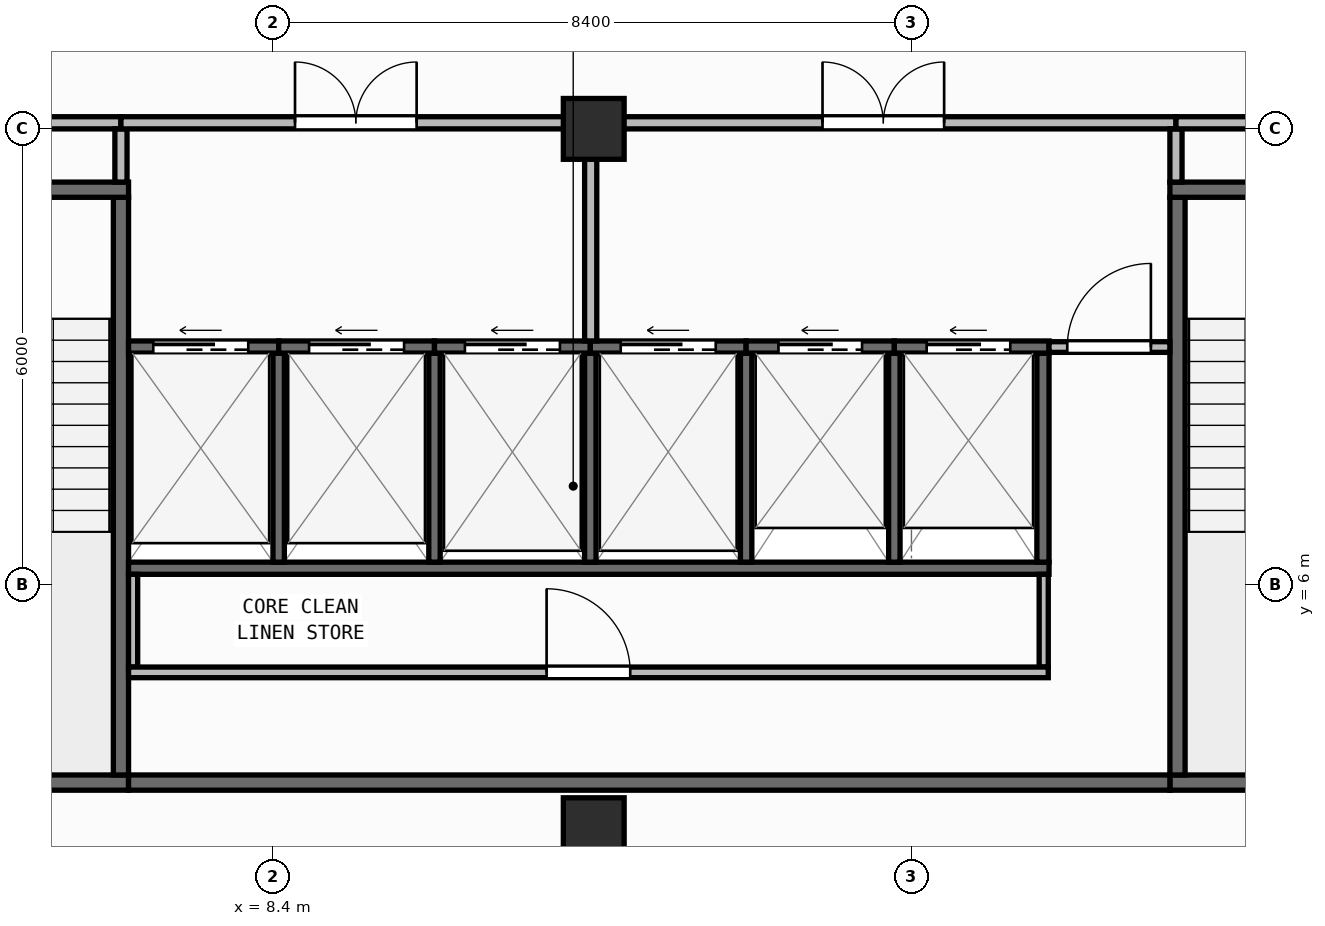
"""IFC4 building model, lengths in metres.
Left out: names, types, materials, properties, quantities, classifications, styles, units other than length and angle.
Written with IfcOpenShell. Run it as: python <this file> out.ifc"""

import sys

from ifc_helpers import new_model, si_unit, direction, frame, frame_2d, origin, origin_2d, place, context, subcontext, project, spatial, rectangle, extrude, element, fill, save


model = new_model("IFC4")
c1 = context("Model", 3, precision=1e-05, world=origin(), true_north=direction((0.0, 1.0)))
c2 = subcontext(c1, "Body", "Model", "MODEL_VIEW")
j1 = project(units=[si_unit("LENGTHUNIT", "METRE"), si_unit("PLANEANGLEUNIT", "RADIAN")], contexts=[c1])
p1 = place(None, origin())
s1 = spatial("IfcSite", under=j1, at=p1, CompositionType="ELEMENT")
p2 = place(p1, origin())
s2 = spatial("IfcBuilding", under=s1, at=p2, CompositionType="ELEMENT")
p3 = place(p2, frame((0.0, 0.0, 252.6)))
s3 = spatial("IfcBuildingStorey", under=s2, at=p3, CompositionType="ELEMENT", Elevation=252.6)
for number, where, z_axis, x_axis in (
    (1, (12.62, 2.8, 0.0), (0.0, 0.0, 1.0), (1.0, 0.0, 0.0)),
    (2, (12.62, 12.0, 0.0), (0.0, 0.0, 1.0), (1.0, 0.0, 0.0)),
):
    element("IfcColumn", number, at=place(p3, frame(where, z_axis=z_axis, x_axis=x_axis)), inside=s3, PredefinedType="COLUMN", context=c2, shape_type="SweptSolid", body=[
        extrude(rectangle(XDim=0.8, YDim=0.8, at=origin_2d()), origin(), (0.0, 0.0, 1.0), 3.95),
    ])
p4 = place(p3, frame((2.66, 0.174, 0.0), z_axis=(0.0, 0.0, 1.0), x_axis=(0.996611813627, 0.082248969229, 0.0)))
e3 = element("IfcWall", 3, at=p4, inside=s3, PredefinedType="STANDARD", context=c2, shape_type="SweptSolid", body=[
    extrude(rectangle(XDim=41.019, YDim=0.26, at=frame_2d((20.51, 0.0))), origin(), (0.0, 0.0, 1.0), 3.71),
])
p5 = place(p4, frame((19.31, 0.0, 0.9)))
e4 = element("IfcOpeningElement", 4, at=p5, cuts=e3, PredefinedType="OPENING", context=c2, shape_type="SweptSolid", body=[
    extrude(rectangle(XDim=2.4, YDim=1.65, at=frame_2d((1.2, 0.825))), frame((0.0, 0.14, 0.0), z_axis=(0.0, -1.0, 0.0), x_axis=(1.0, 0.0, 0.0)), (0.0, 0.0, 1.0), 0.28),
])
p6 = place(p3, frame((2.8, 3.4, 0.0), z_axis=(0.0, 0.0, 1.0), x_axis=(1.0, 0.0, 0.0)))
e5 = element("IfcWall", 5, at=p6, inside=s3, PredefinedType="SHEAR", context=c2, shape_type="SweptSolid", body=[
    extrude(rectangle(XDim=3.7, YDim=0.2, at=frame_2d((1.85, 0.0))), origin(), (0.0, 0.0, 1.0), 3.71),
])
p7 = place(p3, frame((6.4, 3.5, 0.0), z_axis=(0.0, 0.0, 1.0), x_axis=(0.0, 1.0, 0.0)))
e6 = element("IfcWall", 6, at=p7, inside=s3, PredefinedType="SHEAR", context=c2, shape_type="SweptSolid", body=[
    extrude(rectangle(XDim=7.6, YDim=0.2, at=frame_2d((3.8, 0.0))), origin(), (0.0, 0.0, 1.0), 3.71),
])
p8 = place(p3, frame((2.8, 11.2, 0.0), z_axis=(0.0, 0.0, 1.0), x_axis=(1.0, 0.0, 0.0)))
e7 = element("IfcWall", 7, at=p8, inside=s3, PredefinedType="SHEAR", context=c2, shape_type="SweptSolid", body=[
    extrude(rectangle(XDim=3.7, YDim=0.2, at=frame_2d((1.85, 0.0))), origin(), (0.0, 0.0, 1.0), 3.71),
])
p9 = place(p8, frame((1.2, 0.0, 0.0)))
e8 = element("IfcOpeningElement", 8, at=p9, cuts=e7, PredefinedType="OPENING", context=c2, shape_type="SweptSolid", body=[
    extrude(rectangle(XDim=1.3, YDim=2.15, at=frame_2d((0.65, 1.075))), frame((0.0, 0.11, 0.0), z_axis=(0.0, -1.0, 0.0), x_axis=(1.0, 0.0, 0.0)), (0.0, 0.0, 1.0), 0.22),
])
p10 = place(p3, frame((20.2, 3.4, 0.0), z_axis=(0.0, 0.0, 1.0), x_axis=(1.0, 0.0, 0.0)))
e9 = element("IfcWall", 9, at=p10, inside=s3, PredefinedType="SHEAR", context=c2, shape_type="SweptSolid", body=[
    extrude(rectangle(XDim=3.7, YDim=0.2, at=frame_2d((1.85, 0.0))), origin(), (0.0, 0.0, 1.0), 3.71),
])
p11 = place(p3, frame((20.3, 3.5, 0.0), z_axis=(0.0, 0.0, 1.0), x_axis=(0.0, 1.0, 0.0)))
e10 = element("IfcWall", 10, at=p11, inside=s3, PredefinedType="SHEAR", context=c2, shape_type="SweptSolid", body=[
    extrude(rectangle(XDim=7.6, YDim=0.2, at=frame_2d((3.8, 0.0))), origin(), (0.0, 0.0, 1.0), 3.71),
])
p12 = place(p3, frame((20.2, 11.2, 0.0), z_axis=(0.0, 0.0, 1.0), x_axis=(1.0, 0.0, 0.0)))
e11 = element("IfcWall", 11, at=p12, inside=s3, PredefinedType="SHEAR", context=c2, shape_type="SweptSolid", body=[
    extrude(rectangle(XDim=3.7, YDim=0.2, at=frame_2d((1.85, 0.0))), origin(), (0.0, 0.0, 1.0), 3.71),
])
p13 = place(p12, frame((1.2, 0.0, 0.0)))
e12 = element("IfcOpeningElement", 12, at=p13, cuts=e11, PredefinedType="OPENING", context=c2, shape_type="SweptSolid", body=[
    extrude(rectangle(XDim=1.3, YDim=2.15, at=frame_2d((0.65, 1.075))), frame((0.0, 0.11, 0.0), z_axis=(0.0, -1.0, 0.0), x_axis=(1.0, 0.0, 0.0)), (0.0, 0.0, 1.0), 0.22),
])
p14 = place(p3, frame((6.5, 3.4, 0.0), z_axis=(0.0, 0.0, 1.0), x_axis=(1.0, 0.0, 0.0)))
e13 = element("IfcWall", 13, at=p14, inside=s3, PredefinedType="SHEAR", context=c2, shape_type="SweptSolid", body=[
    extrude(rectangle(XDim=13.7, YDim=0.2, at=frame_2d((6.85, 0.0))), origin(), (0.0, 0.0, 1.0), 3.71),
])
p15 = place(p3, frame((6.5, 6.22, 0.0), z_axis=(0.0, 0.0, 1.0), x_axis=(1.0, 0.0, 0.0)))
e14 = element("IfcWall", 14, at=p15, inside=s3, PredefinedType="SHEAR", context=c2, shape_type="SweptSolid", body=[
    extrude(rectangle(XDim=12.11, YDim=0.16, at=frame_2d((6.055, 0.0))), origin(), (0.0, 0.0, 1.0), 3.71),
])
p16 = place(p3, frame((18.53, 6.3, 0.0), z_axis=(0.0, 0.0, 1.0), x_axis=(0.0, 1.0, 0.0)))
e15 = element("IfcWall", 15, at=p16, inside=s3, PredefinedType="SHEAR", context=c2, shape_type="SweptSolid", body=[
    extrude(rectangle(XDim=2.75, YDim=0.16, at=frame_2d((1.375, 0.0))), origin(), (0.0, 0.0, 1.0), 3.71),
])
for number, where, z_axis, x_axis in (
    (16, (8.475, 6.3, 0.0), (0.0, 0.0, 1.0), (0.0, 1.0, 0.0)),
    (17, (10.525, 6.3, 0.0), (0.0, 0.0, 1.0), (0.0, 1.0, 0.0)),
    (18, (12.575, 6.3, 0.0), (0.0, 0.0, 1.0), (0.0, 1.0, 0.0)),
    (19, (14.625, 6.3, 0.0), (0.0, 0.0, 1.0), (0.0, 1.0, 0.0)),
    (20, (16.575, 6.3, 0.0), (0.0, 0.0, 1.0), (0.0, 1.0, 0.0)),
):
    element("IfcWall", number, at=place(p3, frame(where, z_axis=z_axis, x_axis=x_axis)), inside=s3, PredefinedType="SHEAR", context=c2, shape_type="SweptSolid", body=[
        extrude(rectangle(XDim=2.75, YDim=0.15, at=frame_2d((1.375, 0.0))), origin(), (0.0, 0.0, 1.0), 3.71),
    ])
p17 = place(p3, frame((6.5, 9.13, 0.0), z_axis=(0.0, 0.0, 1.0), x_axis=(1.0, 0.0, 0.0)))
e21 = element("IfcWall", 21, at=p17, inside=s3, PredefinedType="SHEAR", context=c2, shape_type="SweptSolid", body=[
    extrude(rectangle(XDim=1.975, YDim=0.16, at=frame_2d((0.988, 0.0))), origin(), (0.0, 0.0, 1.0), 3.71),
])
p18 = place(p17, frame((0.325, 0.0, 0.0)))
e22 = element("IfcOpeningElement", 22, at=p18, cuts=e21, PredefinedType="OPENING", context=c2, shape_type="SweptSolid", body=[
    extrude(rectangle(XDim=1.25, YDim=2.15, at=frame_2d((0.625, 1.075))), frame((0.0, 0.09, 0.0), z_axis=(0.0, -1.0, 0.0), x_axis=(1.0, 0.0, 0.0)), (0.0, 0.0, 1.0), 0.18),
])
p19 = place(p3, frame((8.475, 9.13, 0.0), z_axis=(0.0, 0.0, 1.0), x_axis=(1.0, 0.0, 0.0)))
e23 = element("IfcWall", 23, at=p19, inside=s3, PredefinedType="SHEAR", context=c2, shape_type="SweptSolid", body=[
    extrude(rectangle(XDim=2.05, YDim=0.16, at=frame_2d((1.025, 0.0))), origin(), (0.0, 0.0, 1.0), 3.71),
])
p20 = place(p19, frame((0.4, 0.0, 0.0)))
e24 = element("IfcOpeningElement", 24, at=p20, cuts=e23, PredefinedType="OPENING", context=c2, shape_type="SweptSolid", body=[
    extrude(rectangle(XDim=1.25, YDim=2.15, at=frame_2d((0.625, 1.075))), frame((0.0, 0.09, 0.0), z_axis=(0.0, -1.0, 0.0), x_axis=(1.0, 0.0, 0.0)), (0.0, 0.0, 1.0), 0.18),
])
p21 = place(p3, frame((10.525, 9.13, 0.0), z_axis=(0.0, 0.0, 1.0), x_axis=(1.0, 0.0, 0.0)))
e25 = element("IfcWall", 25, at=p21, inside=s3, PredefinedType="SHEAR", context=c2, shape_type="SweptSolid", body=[
    extrude(rectangle(XDim=2.05, YDim=0.16, at=frame_2d((1.025, 0.0))), origin(), (0.0, 0.0, 1.0), 3.71),
])
p22 = place(p21, frame((0.4, 0.0, 0.0)))
e26 = element("IfcOpeningElement", 26, at=p22, cuts=e25, PredefinedType="OPENING", context=c2, shape_type="SweptSolid", body=[
    extrude(rectangle(XDim=1.25, YDim=2.15, at=frame_2d((0.625, 1.075))), frame((0.0, 0.09, 0.0), z_axis=(0.0, -1.0, 0.0), x_axis=(1.0, 0.0, 0.0)), (0.0, 0.0, 1.0), 0.18),
])
p23 = place(p3, frame((12.575, 9.13, 0.0), z_axis=(0.0, 0.0, 1.0), x_axis=(1.0, 0.0, 0.0)))
e27 = element("IfcWall", 27, at=p23, inside=s3, PredefinedType="SHEAR", context=c2, shape_type="SweptSolid", body=[
    extrude(rectangle(XDim=2.05, YDim=0.16, at=frame_2d((1.025, 0.0))), origin(), (0.0, 0.0, 1.0), 3.71),
])
p24 = place(p23, frame((0.4, 0.0, 0.0)))
e28 = element("IfcOpeningElement", 28, at=p24, cuts=e27, PredefinedType="OPENING", context=c2, shape_type="SweptSolid", body=[
    extrude(rectangle(XDim=1.25, YDim=2.15, at=frame_2d((0.625, 1.075))), frame((0.0, 0.09, 0.0), z_axis=(0.0, -1.0, 0.0), x_axis=(1.0, 0.0, 0.0)), (0.0, 0.0, 1.0), 0.18),
])
p25 = place(p3, frame((14.625, 9.13, 0.0), z_axis=(0.0, 0.0, 1.0), x_axis=(1.0, 0.0, 0.0)))
e29 = element("IfcWall", 29, at=p25, inside=s3, PredefinedType="SHEAR", context=c2, shape_type="SweptSolid", body=[
    extrude(rectangle(XDim=1.95, YDim=0.16, at=frame_2d((0.975, 0.0))), origin(), (0.0, 0.0, 1.0), 3.71),
])
p26 = place(p25, frame((0.425, 0.0, 0.0)))
e30 = element("IfcOpeningElement", 30, at=p26, cuts=e29, PredefinedType="OPENING", context=c2, shape_type="SweptSolid", body=[
    extrude(rectangle(XDim=1.1, YDim=2.15, at=frame_2d((0.55, 1.075))), frame((0.0, 0.09, 0.0), z_axis=(0.0, -1.0, 0.0), x_axis=(1.0, 0.0, 0.0)), (0.0, 0.0, 1.0), 0.18),
])
p27 = place(p3, frame((16.575, 9.13, 0.0), z_axis=(0.0, 0.0, 1.0), x_axis=(1.0, 0.0, 0.0)))
e31 = element("IfcWall", 31, at=p27, inside=s3, PredefinedType="SHEAR", context=c2, shape_type="SweptSolid", body=[
    extrude(rectangle(XDim=2.035, YDim=0.16, at=frame_2d((1.018, 0.0))), origin(), (0.0, 0.0, 1.0), 3.71),
])
p28 = place(p27, frame((0.425, 0.0, 0.0)))
e32 = element("IfcOpeningElement", 32, at=p28, cuts=e31, PredefinedType="OPENING", context=c2, shape_type="SweptSolid", body=[
    extrude(rectangle(XDim=1.1, YDim=2.15, at=frame_2d((0.55, 1.075))), frame((0.0, 0.09, 0.0), z_axis=(0.0, -1.0, 0.0), x_axis=(1.0, 0.0, 0.0)), (0.0, 0.0, 1.0), 0.18),
])
for number, where, z_axis, x_axis in (
    (33, (6.56, 4.92, 0.0), (0.0, 0.0, 1.0), (0.0, 1.0, 0.0)),
    (34, (18.54, 4.92, 0.0), (0.0, 0.0, 1.0), (0.0, 1.0, 0.0)),
):
    element("IfcWall", number, at=place(p3, frame(where, z_axis=z_axis, x_axis=x_axis)), inside=s3, PredefinedType="PARTITIONING", context=c2, shape_type="SweptSolid", body=[
        extrude(rectangle(XDim=1.22, YDim=0.12, at=frame_2d((0.61, 0.0))), origin(), (0.0, 0.0, 1.0), 3.71),
    ])
p29 = place(p3, frame((6.5, 4.85, 0.0), z_axis=(0.0, 0.0, 1.0), x_axis=(1.0, 0.0, 0.0)))
e35 = element("IfcWall", 35, at=p29, inside=s3, PredefinedType="PARTITIONING", context=c2, shape_type="SweptSolid", body=[
    extrude(rectangle(XDim=12.1, YDim=0.14, at=frame_2d((6.05, 0.0))), origin(), (0.0, 0.0, 1.0), 3.71),
])
p30 = place(p29, frame((5.5, 0.0, 0.0)))
e36 = element("IfcOpeningElement", 36, at=p30, cuts=e35, PredefinedType="OPENING", context=c2, shape_type="SweptSolid", body=[
    extrude(rectangle(XDim=1.1, YDim=2.1, at=frame_2d((0.55, 1.05))), frame((0.0, 0.08, 0.0), z_axis=(0.0, -1.0, 0.0), x_axis=(1.0, 0.0, 0.0)), (0.0, 0.0, 1.0), 0.16),
])
p31 = place(p3, frame((18.61, 9.13, 0.0), z_axis=(0.0, 0.0, 1.0), x_axis=(1.0, 0.0, 0.0)))
e37 = element("IfcWall", 37, at=p31, inside=s3, PredefinedType="PARTITIONING", context=c2, shape_type="SweptSolid", body=[
    extrude(rectangle(XDim=1.59, YDim=0.14, at=frame_2d((0.795, 0.0))), origin(), (0.0, 0.0, 1.0), 3.71),
])
p32 = place(p31, frame((0.24, 0.0, 0.0)))
e38 = element("IfcOpeningElement", 38, at=p32, cuts=e37, PredefinedType="OPENING", context=c2, shape_type="SweptSolid", body=[
    extrude(rectangle(XDim=1.1, YDim=2.1, at=frame_2d((0.55, 1.05))), frame((0.0, 0.08, 0.0), z_axis=(0.0, -1.0, 0.0), x_axis=(1.0, 0.0, 0.0)), (0.0, 0.0, 1.0), 0.16),
])
p33 = place(p3, frame((2.8, 12.08, 0.0), z_axis=(0.0, 0.0, 1.0), x_axis=(1.0, 0.0, 0.0)))
e39 = element("IfcWall", 39, at=p33, inside=s3, PredefinedType="PARTITIONING", context=c2, shape_type="SweptSolid", body=[
    extrude(rectangle(XDim=3.6, YDim=0.16, at=frame_2d((1.8, 0.0))), origin(), (0.0, 0.0, 1.0), 3.157),
])
p34 = place(p33, frame((1.0, 0.0, 0.0)))
e40 = element("IfcOpeningElement", 40, at=p34, cuts=e39, PredefinedType="OPENING", context=c2, shape_type="SweptSolid", body=[
    extrude(rectangle(XDim=1.6, YDim=2.05, at=frame_2d((0.8, 1.025))), frame((0.0, 0.09, 0.0), z_axis=(0.0, -1.0, 0.0), x_axis=(1.0, 0.0, 0.0)), (0.0, 0.0, 1.0), 0.18),
])
p35 = place(p3, frame((6.4, 11.3, 0.0), z_axis=(0.0, 0.0, 1.0), x_axis=(0.0, 1.0, 0.0)))
e41 = element("IfcWall", 41, at=p35, inside=s3, PredefinedType="PARTITIONING", context=c2, shape_type="SweptSolid", body=[
    extrude(rectangle(XDim=0.7, YDim=0.16, at=frame_2d((0.35, 0.0))), origin(), (0.0, 0.0, 1.0), 3.71),
])
p36 = place(p3, frame((6.4, 12.08, 0.0), z_axis=(0.0, 0.0, 1.0), x_axis=(1.0, 0.0, 0.0)))
e42 = element("IfcWall", 42, at=p36, inside=s3, PredefinedType="PARTITIONING", context=c2, shape_type="SweptSolid", body=[
    extrude(rectangle(XDim=6.18, YDim=0.16, at=frame_2d((3.09, 0.0))), origin(), (0.0, 0.0, 1.0), 3.157),
])
p37 = place(p36, frame((2.29, 0.0, 0.0)))
e43 = element("IfcOpeningElement", 43, at=p37, cuts=e42, PredefinedType="OPENING", context=c2, shape_type="SweptSolid", body=[
    extrude(rectangle(XDim=1.6, YDim=2.05, at=frame_2d((0.8, 1.025))), frame((0.0, 0.09, 0.0), z_axis=(0.0, -1.0, 0.0), x_axis=(1.0, 0.0, 0.0)), (0.0, 0.0, 1.0), 0.18),
])
p38 = place(p3, frame((12.58, 9.21, 0.0), z_axis=(0.0, 0.0, 1.0), x_axis=(0.0, 1.0, 0.0)))
e44 = element("IfcWall", 44, at=p38, inside=s3, PredefinedType="PARTITIONING", context=c2, shape_type="SweptSolid", body=[
    extrude(rectangle(XDim=2.79, YDim=0.16, at=frame_2d((1.395, 0.0))), origin(), (0.0, 0.0, 1.0), 3.71),
])
p39 = place(p3, frame((12.58, 12.08, 0.0), z_axis=(0.0, 0.0, 1.0), x_axis=(1.0, 0.0, 0.0)))
e45 = element("IfcWall", 45, at=p39, inside=s3, PredefinedType="PARTITIONING", context=c2, shape_type="SweptSolid", body=[
    extrude(rectangle(XDim=7.7, YDim=0.16, at=frame_2d((3.85, 0.0))), origin(), (0.0, 0.0, 1.0), 3.157),
])
p40 = place(p39, frame((3.05, 0.0, 0.0)))
e46 = element("IfcOpeningElement", 46, at=p40, cuts=e45, PredefinedType="OPENING", context=c2, shape_type="SweptSolid", body=[
    extrude(rectangle(XDim=1.6, YDim=2.05, at=frame_2d((0.8, 1.025))), frame((0.0, 0.09, 0.0), z_axis=(0.0, -1.0, 0.0), x_axis=(1.0, 0.0, 0.0)), (0.0, 0.0, 1.0), 0.18),
])
p41 = place(p3, frame((20.28, 11.3, 0.0), z_axis=(0.0, 0.0, 1.0), x_axis=(0.0, 1.0, 0.0)))
e47 = element("IfcWall", 47, at=p41, inside=s3, PredefinedType="PARTITIONING", context=c2, shape_type="SweptSolid", body=[
    extrude(rectangle(XDim=0.7, YDim=0.16, at=frame_2d((0.35, 0.0))), origin(), (0.0, 0.0, 1.0), 3.71),
])
p42 = place(p3, frame((20.28, 12.08, 0.0), z_axis=(0.0, 0.0, 1.0), x_axis=(1.0, 0.0, 0.0)))
e48 = element("IfcWall", 48, at=p42, inside=s3, PredefinedType="PARTITIONING", context=c2, shape_type="SweptSolid", body=[
    extrude(rectangle(XDim=3.62, YDim=0.16, at=frame_2d((1.81, 0.0))), origin(), (0.0, 0.0, 1.0), 3.157),
])
p43 = place(p42, frame((1.01, 0.0, 0.0)))
e49 = element("IfcOpeningElement", 49, at=p43, cuts=e48, PredefinedType="OPENING", context=c2, shape_type="SweptSolid", body=[
    extrude(rectangle(XDim=1.6, YDim=2.05, at=frame_2d((0.8, 1.025))), frame((0.0, 0.09, 0.0), z_axis=(0.0, -1.0, 0.0), x_axis=(1.0, 0.0, 0.0)), (0.0, 0.0, 1.0), 0.18),
])
p44 = place(p18, origin())
e50 = element("IfcDoor", 50, at=p44, inside=s3, OperationType="SLIDING_TO_LEFT", PredefinedType="DOOR", context=c2, shape_type="SweptSolid", body=[
    extrude(rectangle(XDim=1.25, YDim=2.15, at=frame_2d((0.625, 1.075))), frame((0.0, 0.025, 0.0), z_axis=(0.0, -1.0, 0.0), x_axis=(1.0, 0.0, 0.0)), (0.0, 0.0, 1.0), 0.05),
])
fill(e22, e50)
p45 = place(p20, origin())
e51 = element("IfcDoor", 51, at=p45, inside=s3, OperationType="SLIDING_TO_LEFT", PredefinedType="DOOR", context=c2, shape_type="SweptSolid", body=[
    extrude(rectangle(XDim=1.25, YDim=2.15, at=frame_2d((0.625, 1.075))), frame((0.0, 0.025, 0.0), z_axis=(0.0, -1.0, 0.0), x_axis=(1.0, 0.0, 0.0)), (0.0, 0.0, 1.0), 0.05),
])
fill(e24, e51)
p46 = place(p22, origin())
e52 = element("IfcDoor", 52, at=p46, inside=s3, OperationType="SLIDING_TO_LEFT", PredefinedType="DOOR", context=c2, shape_type="SweptSolid", body=[
    extrude(rectangle(XDim=1.25, YDim=2.15, at=frame_2d((0.625, 1.075))), frame((0.0, 0.025, 0.0), z_axis=(0.0, -1.0, 0.0), x_axis=(1.0, 0.0, 0.0)), (0.0, 0.0, 1.0), 0.05),
])
fill(e26, e52)
p47 = place(p24, origin())
e53 = element("IfcDoor", 53, at=p47, inside=s3, OperationType="SLIDING_TO_LEFT", PredefinedType="DOOR", context=c2, shape_type="SweptSolid", body=[
    extrude(rectangle(XDim=1.25, YDim=2.15, at=frame_2d((0.625, 1.075))), frame((0.0, 0.025, 0.0), z_axis=(0.0, -1.0, 0.0), x_axis=(1.0, 0.0, 0.0)), (0.0, 0.0, 1.0), 0.05),
])
fill(e28, e53)
p48 = place(p26, origin())
e54 = element("IfcDoor", 54, at=p48, inside=s3, OperationType="SLIDING_TO_LEFT", PredefinedType="DOOR", context=c2, shape_type="SweptSolid", body=[
    extrude(rectangle(XDim=1.1, YDim=2.15, at=frame_2d((0.55, 1.075))), frame((0.0, 0.025, 0.0), z_axis=(0.0, -1.0, 0.0), x_axis=(1.0, 0.0, 0.0)), (0.0, 0.0, 1.0), 0.05),
])
fill(e30, e54)
p49 = place(p28, origin())
e55 = element("IfcDoor", 55, at=p49, inside=s3, OperationType="SLIDING_TO_LEFT", PredefinedType="DOOR", context=c2, shape_type="SweptSolid", body=[
    extrude(rectangle(XDim=1.1, YDim=2.15, at=frame_2d((0.55, 1.075))), frame((0.0, 0.025, 0.0), z_axis=(0.0, -1.0, 0.0), x_axis=(1.0, 0.0, 0.0)), (0.0, 0.0, 1.0), 0.05),
])
fill(e32, e55)
p50 = place(p30, origin())
e56 = element("IfcDoor", 56, at=p50, inside=s3, OperationType="SINGLE_SWING_LEFT", PredefinedType="DOOR", context=c2, shape_type="SweptSolid", body=[
    extrude(rectangle(XDim=1.1, YDim=2.1, at=frame_2d((0.55, 1.05))), frame((0.0, 0.025, 0.0), z_axis=(0.0, -1.0, 0.0), x_axis=(1.0, 0.0, 0.0)), (0.0, 0.0, 1.0), 0.05),
])
fill(e36, e56)
p51 = place(p32, origin())
e57 = element("IfcDoor", 57, at=p51, inside=s3, OperationType="SINGLE_SWING_RIGHT", PredefinedType="DOOR", context=c2, shape_type="SweptSolid", body=[
    extrude(rectangle(XDim=1.1, YDim=2.1, at=frame_2d((0.55, 1.05))), frame((0.0, 0.025, 0.0), z_axis=(0.0, -1.0, 0.0), x_axis=(1.0, 0.0, 0.0)), (0.0, 0.0, 1.0), 0.05),
])
fill(e38, e57)
p52 = place(p37, origin())
e58 = element("IfcDoor", 58, at=p52, inside=s3, OperationType="DOUBLE_DOOR_SINGLE_SWING", PredefinedType="DOOR", context=c2, shape_type="SweptSolid", body=[
    extrude(rectangle(XDim=1.6, YDim=2.05, at=frame_2d((0.8, 1.025))), frame((0.0, 0.025, 0.0), z_axis=(0.0, -1.0, 0.0), x_axis=(1.0, 0.0, 0.0)), (0.0, 0.0, 1.0), 0.05),
])
fill(e43, e58)
p53 = place(p40, origin())
e59 = element("IfcDoor", 59, at=p53, inside=s3, OperationType="DOUBLE_DOOR_SINGLE_SWING", PredefinedType="DOOR", context=c2, shape_type="SweptSolid", body=[
    extrude(rectangle(XDim=1.6, YDim=2.05, at=frame_2d((0.8, 1.025))), frame((0.0, 0.025, 0.0), z_axis=(0.0, -1.0, 0.0), x_axis=(1.0, 0.0, 0.0)), (0.0, 0.0, 1.0), 0.05),
])
fill(e46, e59)
save(model, sys.argv[1])
